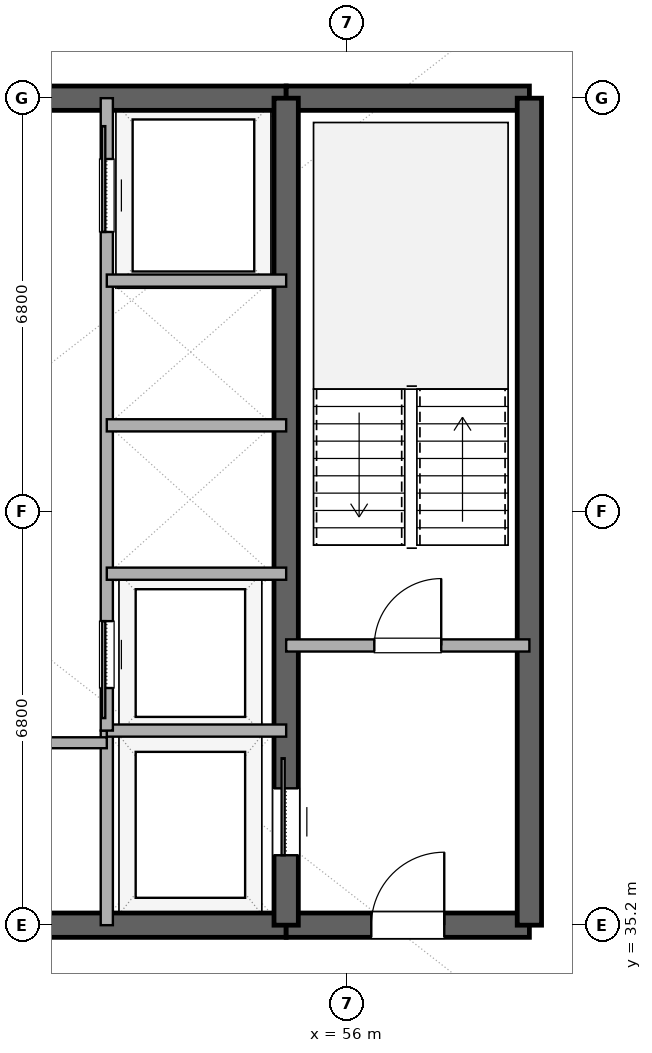
"""IFC4 building model, lengths in metres.
Left out: names, types, materials, properties, quantities, classifications, styles, units other than length and angle.
Written with IfcOpenShell. Run it as: python <this file> out.ifc"""

import sys

from ifc_helpers import new_model, si_unit, direction, frame, frame_2d, origin, place, context, subcontext, project, spatial, rectangle, extrude, element, fill, save


model = new_model("IFC4")
c1 = context("Model", 3, precision=1e-05, world=origin(), true_north=direction((0.0, 1.0)))
c2 = subcontext(c1, "Body", "Model", "MODEL_VIEW")
j1 = project(units=[si_unit("LENGTHUNIT", "METRE"), si_unit("PLANEANGLEUNIT", "RADIAN")], contexts=[c1])
p1 = place(None, origin())
s1 = spatial("IfcSite", under=j1, at=p1, CompositionType="ELEMENT")
p2 = place(p1, origin())
s2 = spatial("IfcBuilding", under=s1, at=p2, CompositionType="ELEMENT")
p3 = place(p2, frame((0.0, 0.0, 253.2)))
s3 = spatial("IfcBuildingStorey", under=s2, at=p3, CompositionType="ELEMENT", Elevation=253.2)
p4 = place(p3, frame((41.0, 35.2, 0.0), z_axis=(0.0, 0.0, 1.0), x_axis=(1.0, 0.0, 0.0)))
e1 = element("IfcWall", 1, at=p4, inside=s3, PredefinedType="SHEAR", context=c2, shape_type="SweptSolid", body=[
    extrude(rectangle(XDim=14.0, YDim=0.4, at=frame_2d((7.0, 0.0))), origin(), (0.0, 0.0, 1.0), 3.25),
])
p5 = place(p4, frame((6.1, 0.0, 0.0)))
e2 = element("IfcOpeningElement", 2, at=p5, cuts=e1, PredefinedType="OPENING", context=c2, shape_type="SweptSolid", body=[
    extrude(rectangle(XDim=1.8, YDim=2.25, at=frame_2d((0.9, 1.125))), frame((0.0, 0.21, 0.0), z_axis=(0.0, -1.0, 0.0), x_axis=(1.0, 0.0, 0.0)), (0.0, 0.0, 1.0), 0.42),
])
p6 = place(p3, frame((55.0, 35.2, 0.0), z_axis=(0.0, 0.0, 1.0), x_axis=(1.0, 0.0, 0.0)))
e3 = element("IfcWall", 3, at=p6, inside=s3, PredefinedType="SHEAR", context=c2, shape_type="SweptSolid", body=[
    extrude(rectangle(XDim=4.0, YDim=0.4, at=frame_2d((2.0, 0.0))), origin(), (0.0, 0.0, 1.0), 3.25),
])
p7 = place(p6, frame((1.4, 0.0, 0.0)))
e4 = element("IfcOpeningElement", 4, at=p7, cuts=e3, PredefinedType="OPENING", context=c2, shape_type="SweptSolid", body=[
    extrude(rectangle(XDim=1.2, YDim=2.15, at=frame_2d((0.6, 1.075))), frame((0.0, 0.21, 0.0), z_axis=(0.0, -1.0, 0.0), x_axis=(1.0, 0.0, 0.0)), (0.0, 0.0, 1.0), 0.42),
])
p8 = place(p3, frame((41.0, 48.8, 0.0), z_axis=(0.0, 0.0, 1.0), x_axis=(1.0, 0.0, 0.0)))
e5 = element("IfcWall", 5, at=p8, inside=s3, PredefinedType="SHEAR", context=c2, shape_type="SweptSolid", body=[
    extrude(rectangle(XDim=14.0, YDim=0.4, at=frame_2d((7.0, 0.0))), origin(), (0.0, 0.0, 1.0), 3.25),
])
p9 = place(p8, frame((6.1, 0.0, 0.0)))
e6 = element("IfcOpeningElement", 6, at=p9, cuts=e5, PredefinedType="OPENING", context=c2, shape_type="SweptSolid", body=[
    extrude(rectangle(XDim=1.8, YDim=2.25, at=frame_2d((0.9, 1.125))), frame((0.0, 0.21, 0.0), z_axis=(0.0, -1.0, 0.0), x_axis=(1.0, 0.0, 0.0)), (0.0, 0.0, 1.0), 0.42),
])
p10 = place(p3, frame((55.0, 48.8, 0.0), z_axis=(0.0, 0.0, 1.0), x_axis=(1.0, 0.0, 0.0)))
e7 = element("IfcWall", 7, at=p10, inside=s3, PredefinedType="SHEAR", context=c2, shape_type="SweptSolid", body=[
    extrude(rectangle(XDim=4.0, YDim=0.4, at=frame_2d((2.0, 0.0))), origin(), (0.0, 0.0, 1.0), 3.25),
])
p11 = place(p3, frame((59.0, 35.2, 0.0), z_axis=(0.0, 0.0, 1.0), x_axis=(0.0, 1.0, 0.0)))
e8 = element("IfcWall", 8, at=p11, inside=s3, PredefinedType="SHEAR", context=c2, shape_type="SweptSolid", body=[
    extrude(rectangle(XDim=13.6, YDim=0.4, at=frame_2d((6.8, 0.0))), origin(), (0.0, 0.0, 1.0), 3.25),
])
p12 = place(p3, frame((55.0, 35.2, 0.0), z_axis=(0.0, 0.0, 1.0), x_axis=(0.0, 1.0, 0.0)))
e9 = element("IfcWall", 9, at=p12, inside=s3, PredefinedType="SHEAR", context=c2, shape_type="SweptSolid", body=[
    extrude(rectangle(XDim=13.6, YDim=0.4, at=frame_2d((6.8, 0.0))), origin(), (0.0, 0.0, 1.0), 3.25),
])
p13 = place(p12, frame((1.15, 0.0, 0.0)))
e10 = element("IfcOpeningElement", 10, at=p13, cuts=e9, PredefinedType="OPENING", context=c2, shape_type="SweptSolid", body=[
    extrude(rectangle(XDim=1.1, YDim=2.2, at=frame_2d((0.55, 1.1))), frame((0.0, 0.21, 0.0), z_axis=(0.0, -1.0, 0.0), x_axis=(1.0, 0.0, 0.0)), (0.0, 0.0, 1.0), 0.42),
])
p14 = place(p3, frame((55.0, 39.8, 0.0), z_axis=(0.0, 0.0, 1.0), x_axis=(1.0, 0.0, 0.0)))
e11 = element("IfcWall", 11, at=p14, inside=s3, PredefinedType="SOLIDWALL", context=c2, shape_type="SweptSolid", body=[
    extrude(rectangle(XDim=4.0, YDim=0.2, at=frame_2d((2.0, 0.0))), origin(), (0.0, 0.0, 1.0), 2.61),
])
p15 = place(p14, frame((1.45, 0.0, 0.0)))
e12 = element("IfcOpeningElement", 12, at=p15, cuts=e11, PredefinedType="OPENING", context=c2, shape_type="SweptSolid", body=[
    extrude(rectangle(XDim=1.1, YDim=2.15, at=frame_2d((0.55, 1.075))), frame((0.0, 0.11, 0.0), z_axis=(0.0, -1.0, 0.0), x_axis=(1.0, 0.0, 0.0)), (0.0, 0.0, 1.0), 0.22),
])
p16 = place(p3, frame((52.05, 35.2, 0.0), z_axis=(0.0, 0.0, 1.0), x_axis=(0.0, 1.0, 0.0)))
e13 = element("IfcWall", 13, at=p16, inside=s3, PredefinedType="SOLIDWALL", context=c2, shape_type="SweptSolid", body=[
    extrude(rectangle(XDim=3.2, YDim=0.2, at=frame_2d((1.6, 0.0))), origin(), (0.0, 0.0, 1.0), 2.61),
])
p17 = place(p3, frame((52.05, 38.4, 0.0), z_axis=(0.0, 0.0, 1.0), x_axis=(1.0, 0.0, 0.0)))
e14 = element("IfcWall", 14, at=p17, inside=s3, PredefinedType="SOLIDWALL", context=c2, shape_type="SweptSolid", body=[
    extrude(rectangle(XDim=2.95, YDim=0.2, at=frame_2d((1.475, 0.0))), origin(), (0.0, 0.0, 1.0), 2.61),
])
p18 = place(p3, frame((52.05, 38.4, 0.0), z_axis=(0.0, 0.0, 1.0), x_axis=(0.0, 1.0, 0.0)))
e15 = element("IfcWall", 15, at=p18, inside=s3, PredefinedType="SOLIDWALL", context=c2, shape_type="SweptSolid", body=[
    extrude(rectangle(XDim=10.4, YDim=0.2, at=frame_2d((5.2, 0.0))), origin(), (0.0, 0.0, 1.0), 2.61),
])
p19 = place(p18, frame((0.7, 0.0, 0.0)))
e16 = element("IfcOpeningElement", 16, at=p19, cuts=e15, PredefinedType="OPENING", context=c2, shape_type="SweptSolid", body=[
    extrude(rectangle(XDim=1.1, YDim=2.2, at=frame_2d((0.55, 1.1))), frame((0.0, 0.11, 0.0), z_axis=(0.0, -1.0, 0.0), x_axis=(1.0, 0.0, 0.0)), (0.0, 0.0, 1.0), 0.22),
])
p20 = place(p18, frame((8.2, 0.0, 0.0)))
e17 = element("IfcOpeningElement", 17, at=p20, cuts=e15, PredefinedType="OPENING", context=c2, shape_type="SweptSolid", body=[
    extrude(rectangle(XDim=1.2, YDim=2.2, at=frame_2d((0.6, 1.1))), frame((0.0, 0.11, 0.0), z_axis=(0.0, -1.0, 0.0), x_axis=(1.0, 0.0, 0.0)), (0.0, 0.0, 1.0), 0.22),
])
for number, where, z_axis, x_axis in (
    (18, (52.05, 40.98, 0.0), (0.0, 0.0, 1.0), (1.0, 0.0, 0.0)),
    (19, (52.05, 43.42, 0.0), (0.0, 0.0, 1.0), (1.0, 0.0, 0.0)),
    (20, (52.05, 45.8, 0.0), (0.0, 0.0, 1.0), (1.0, 0.0, 0.0)),
):
    element("IfcWall", number, at=place(p3, frame(where, z_axis=z_axis, x_axis=x_axis)), inside=s3, PredefinedType="SOLIDWALL", context=c2, shape_type="SweptSolid", body=[
        extrude(rectangle(XDim=2.95, YDim=0.2, at=frame_2d((1.475, 0.0))), origin(), (0.0, 0.0, 1.0), 2.61),
    ])
p21 = place(p3, frame((49.9, 38.2, 0.0), z_axis=(0.0, 0.0, 1.0), x_axis=(1.0, 0.0, 0.0)))
e21 = element("IfcWall", 21, at=p21, inside=s3, PredefinedType="PLUMBINGWALL", context=c2, shape_type="SweptSolid", body=[
    extrude(rectangle(XDim=2.15, YDim=0.18, at=frame_2d((1.075, 0.0))), origin(), (0.0, 0.0, 1.0), 2.61),
])
p22 = place(p13, origin())
e22 = element("IfcDoor", 22, at=p22, inside=s3, OperationType="SLIDING_TO_RIGHT", PredefinedType="DOOR", context=c2, shape_type="SweptSolid", body=[
    extrude(rectangle(XDim=1.1, YDim=2.2, at=frame_2d((0.55, 1.1))), frame((0.0, 0.025, 0.0), z_axis=(0.0, -1.0, 0.0), x_axis=(1.0, 0.0, 0.0)), (0.0, 0.0, 1.0), 0.05),
])
fill(e10, e22)
p23 = place(p7, origin())
e23 = element("IfcDoor", 23, at=p23, inside=s3, OperationType="SINGLE_SWING_RIGHT", PredefinedType="DOOR", context=c2, shape_type="SweptSolid", body=[
    extrude(rectangle(XDim=1.2, YDim=2.15, at=frame_2d((0.6, 1.075))), frame((0.0, 0.025, 0.0), z_axis=(0.0, -1.0, 0.0), x_axis=(1.0, 0.0, 0.0)), (0.0, 0.0, 1.0), 0.05),
])
fill(e4, e23)
p24 = place(p15, origin())
e24 = element("IfcDoor", 24, at=p24, inside=s3, OperationType="SINGLE_SWING_RIGHT", PredefinedType="DOOR", context=c2, shape_type="SweptSolid", body=[
    extrude(rectangle(XDim=1.1, YDim=2.15, at=frame_2d((0.55, 1.075))), frame((0.0, 0.025, 0.0), z_axis=(0.0, -1.0, 0.0), x_axis=(1.0, 0.0, 0.0)), (0.0, 0.0, 1.0), 0.05),
])
fill(e12, e24)
p25 = place(p19, origin())
e25 = element("IfcDoor", 25, at=p25, inside=s3, OperationType="SLIDING_TO_LEFT", PredefinedType="DOOR", context=c2, shape_type="SweptSolid", body=[
    extrude(rectangle(XDim=1.1, YDim=2.2, at=frame_2d((0.55, 1.1))), frame((0.0, 0.025, 0.0), z_axis=(0.0, -1.0, 0.0), x_axis=(1.0, 0.0, 0.0)), (0.0, 0.0, 1.0), 0.05),
])
fill(e16, e25)
p26 = place(p20, origin())
e26 = element("IfcDoor", 26, at=p26, inside=s3, OperationType="SLIDING_TO_RIGHT", PredefinedType="DOOR", context=c2, shape_type="SweptSolid", body=[
    extrude(rectangle(XDim=1.2, YDim=2.2, at=frame_2d((0.6, 1.1))), frame((0.0, 0.025, 0.0), z_axis=(0.0, -1.0, 0.0), x_axis=(1.0, 0.0, 0.0)), (0.0, 0.0, 1.0), 0.05),
])
fill(e17, e26)
save(model, sys.argv[1])
